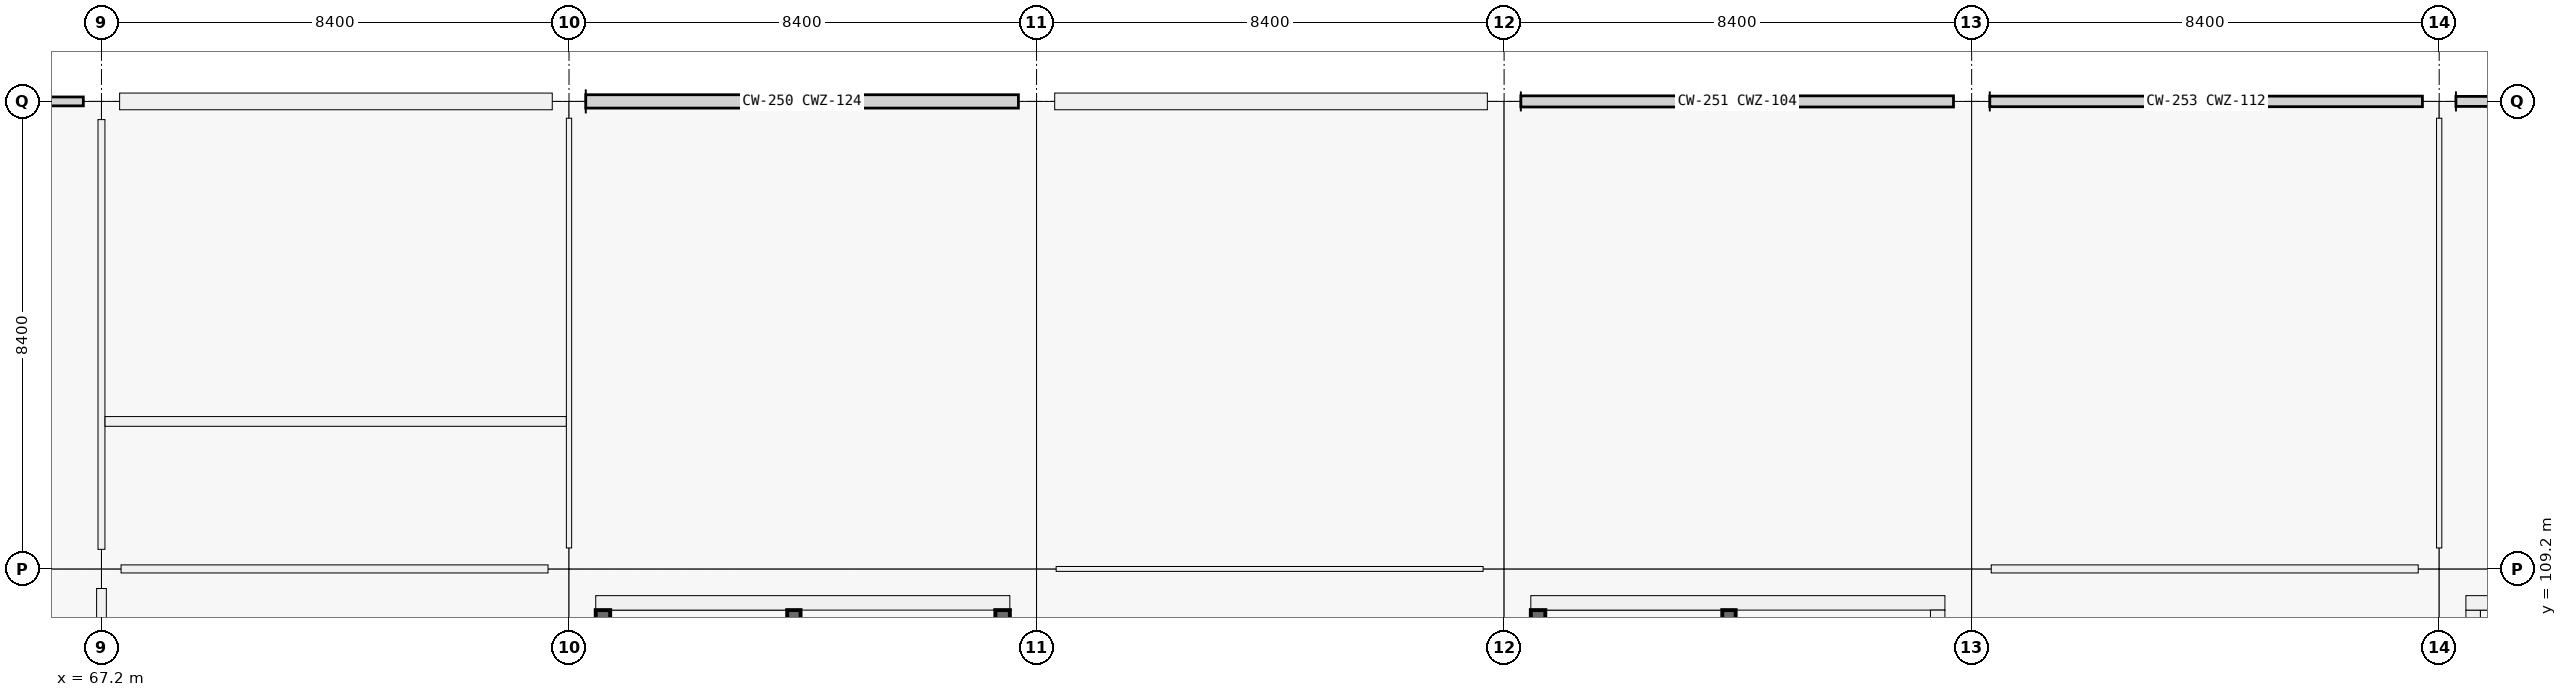
"""IFC4 building model, lengths in metres.
Left out: names, types, materials, properties, quantities, classifications, styles, units other than length and angle.
Written with IfcOpenShell. Run it as: python <this file> out.ifc"""

import sys

from ifc_helpers import new_model, si_unit, direction, frame, frame_2d, origin, origin_2d, place, context, subcontext, project, spatial, rectangle, extrude, element, fill, save


model = new_model("IFC4")
c1 = context("Model", 3, precision=1e-05, world=origin(), true_north=direction((0.0, 1.0)))
c2 = subcontext(c1, "Body", "Model", "MODEL_VIEW")
j1 = project(units=[si_unit("LENGTHUNIT", "METRE"), si_unit("PLANEANGLEUNIT", "RADIAN")], contexts=[c1])
p1 = place(None, origin())
s1 = spatial("IfcSite", under=j1, at=p1, CompositionType="ELEMENT")
p2 = place(p1, origin())
s2 = spatial("IfcBuilding", under=s1, at=p2, CompositionType="ELEMENT")
p3 = place(p2, frame((0.0, 0.0, 19.08)))
s3 = spatial("IfcBuildingStorey", under=s2, at=p3, CompositionType="ELEMENT", Elevation=19.08)
p4 = place(p3, frame((67.2, 109.2, 0.0), z_axis=(0.0, 0.0, 1.0), x_axis=(1.0, 0.0, 0.0)))
e1 = element("IfcColumn", 1, at=p4, inside=s3, PredefinedType="COLUMN", context=c2, shape_type="SweptSolid", body=[
    extrude(rectangle(XDim=0.7, YDim=0.7, at=origin_2d()), origin(), (0.0, 0.0, 1.0), 4.32),
])
p5 = place(p3, frame((67.2, 117.6, 0.0), z_axis=(0.0, 0.0, 1.0), x_axis=(1.0, 0.0, 0.0)))
e2 = element("IfcColumn", 2, at=p5, inside=s3, PredefinedType="COLUMN", context=c2, shape_type="SweptSolid", body=[
    extrude(rectangle(XDim=0.65, YDim=0.65, at=origin_2d()), origin(), (0.0, 0.0, 1.0), 4.32),
])
p6 = place(p3, frame((75.6, 109.2, 0.0), z_axis=(0.0, 0.0, 1.0), x_axis=(1.0, 0.0, 0.0)))
e3 = element("IfcColumn", 3, at=p6, inside=s3, PredefinedType="COLUMN", context=c2, shape_type="SweptSolid", body=[
    extrude(rectangle(XDim=0.75, YDim=0.75, at=origin_2d()), origin(), (0.0, 0.0, 1.0), 4.32),
])
p7 = place(p3, frame((75.6, 117.6, 0.0), z_axis=(0.0, 0.0, 1.0), x_axis=(1.0, 0.0, 0.0)))
e4 = element("IfcColumn", 4, at=p7, inside=s3, PredefinedType="COLUMN", context=c2, shape_type="SweptSolid", body=[
    extrude(rectangle(XDim=0.6, YDim=0.6, at=origin_2d()), origin(), (0.0, 0.0, 1.0), 4.32),
])
p8 = place(p3, frame((84.0, 109.2, 0.0), z_axis=(0.0, 0.0, 1.0), x_axis=(1.0, 0.0, 0.0)))
e5 = element("IfcColumn", 5, at=p8, inside=s3, PredefinedType="COLUMN", context=c2, shape_type="SweptSolid", body=[
    extrude(rectangle(XDim=0.7, YDim=0.7, at=origin_2d()), origin(), (0.0, 0.0, 1.0), 4.32),
])
p9 = place(p3, frame((84.0, 117.6, 0.0), z_axis=(0.0, 0.0, 1.0), x_axis=(1.0, 0.0, 0.0)))
e6 = element("IfcColumn", 6, at=p9, inside=s3, PredefinedType="COLUMN", context=c2, shape_type="SweptSolid", body=[
    extrude(rectangle(XDim=0.65, YDim=0.65, at=origin_2d()), origin(), (0.0, 0.0, 1.0), 4.32),
])
p10 = place(p3, frame((92.4, 109.2, 0.0), z_axis=(0.0, 0.0, 1.0), x_axis=(1.0, 0.0, 0.0)))
e7 = element("IfcColumn", 7, at=p10, inside=s3, PredefinedType="COLUMN", context=c2, shape_type="SweptSolid", body=[
    extrude(rectangle(XDim=0.75, YDim=0.75, at=origin_2d()), origin(), (0.0, 0.0, 1.0), 4.32),
])
p11 = place(p3, frame((92.4, 117.6, 0.0), z_axis=(0.0, 0.0, 1.0), x_axis=(1.0, 0.0, 0.0)))
e8 = element("IfcColumn", 8, at=p11, inside=s3, PredefinedType="COLUMN", context=c2, shape_type="SweptSolid", body=[
    extrude(rectangle(XDim=0.6, YDim=0.6, at=origin_2d()), origin(), (0.0, 0.0, 1.0), 4.32),
])
p12 = place(p3, frame((100.8, 109.2, 0.0), z_axis=(0.0, 0.0, 1.0), x_axis=(1.0, 0.0, 0.0)))
e9 = element("IfcColumn", 9, at=p12, inside=s3, PredefinedType="COLUMN", context=c2, shape_type="SweptSolid", body=[
    extrude(rectangle(XDim=0.7, YDim=0.7, at=origin_2d()), origin(), (0.0, 0.0, 1.0), 4.32),
])
p13 = place(p3, frame((100.8, 117.6, 0.0), z_axis=(0.0, 0.0, 1.0), x_axis=(1.0, 0.0, 0.0)))
e10 = element("IfcColumn", 10, at=p13, inside=s3, PredefinedType="COLUMN", context=c2, shape_type="SweptSolid", body=[
    extrude(rectangle(XDim=0.65, YDim=0.65, at=origin_2d()), origin(), (0.0, 0.0, 1.0), 4.32),
])
p14 = place(p3, frame((109.2, 109.2, 0.0), z_axis=(0.0, 0.0, 1.0), x_axis=(1.0, 0.0, 0.0)))
e11 = element("IfcColumn", 11, at=p14, inside=s3, PredefinedType="COLUMN", context=c2, shape_type="SweptSolid", body=[
    extrude(rectangle(XDim=0.75, YDim=0.75, at=origin_2d()), origin(), (0.0, 0.0, 1.0), 4.32),
])
p15 = place(p3, frame((109.2, 117.6, 0.0), z_axis=(0.0, 0.0, 1.0), x_axis=(1.0, 0.0, 0.0)))
e12 = element("IfcColumn", 12, at=p15, inside=s3, PredefinedType="COLUMN", context=c2, shape_type="SweptSolid", body=[
    extrude(rectangle(XDim=0.6, YDim=0.6, at=origin_2d()), origin(), (0.0, 0.0, 1.0), 4.32),
])
p16 = place(p3, frame((67.526, 117.6, 0.0), z_axis=(0.0, 0.0, 1.0), x_axis=(1.0, 0.0, 0.0)))
e13 = element("IfcWall", 13, at=p16, inside=s3, PredefinedType="SOLIDWALL", context=c2, shape_type="SweptSolid", body=[
    extrude(rectangle(XDim=7.773, YDim=0.3, at=frame_2d((3.887, 0.0))), origin(), (0.0, 0.0, 1.0), 3.37),
])
p17 = place(p16, frame((2.811, 0.0, 0.9)))
e14 = element("IfcOpeningElement", 14, at=p17, cuts=e13, PredefinedType="OPENING", context=c2, shape_type="SweptSolid", body=[
    extrude(rectangle(XDim=2.15, YDim=1.95, at=frame_2d((1.075, 0.975))), frame((0.0, 0.15, 0.0), z_axis=(0.0, -1.0, 0.0), x_axis=(1.0, 0.0, 0.0)), (0.0, 0.0, 1.0), 0.3),
])
p18 = place(p3, frame((84.326, 117.6, 0.0), z_axis=(0.0, 0.0, 1.0), x_axis=(1.0, 0.0, 0.0)))
e15 = element("IfcWall", 15, at=p18, inside=s3, PredefinedType="SOLIDWALL", context=c2, shape_type="SweptSolid", body=[
    extrude(rectangle(XDim=7.773, YDim=0.3, at=frame_2d((3.887, 0.0))), origin(), (0.0, 0.0, 1.0), 3.37),
])
p19 = place(p18, frame((3.236, 0.0, 0.9)))
e16 = element("IfcOpeningElement", 16, at=p19, cuts=e15, PredefinedType="OPENING", context=c2, shape_type="SweptSolid", body=[
    extrude(rectangle(XDim=1.3, YDim=1.95, at=frame_2d((0.65, 0.975))), frame((0.0, 0.15, 0.0), z_axis=(0.0, -1.0, 0.0), x_axis=(1.0, 0.0, 0.0)), (0.0, 0.0, 1.0), 0.3),
])
p20 = place(p3, frame((109.81, 101.54, 0.0), z_axis=(0.0, 0.0, 1.0), x_axis=(0.0, 1.0, 0.0)))
e17 = element("IfcWall", 17, at=p20, inside=s3, PredefinedType="SHEAR", context=c2, shape_type="SweptSolid", body=[
    extrude(rectangle(XDim=6.92, YDim=0.26, at=frame_2d((3.46, 0.0))), origin(), (0.0, 0.0, 1.0), 4.32),
])
p21 = place(p3, frame((109.68, 108.59, 0.0), z_axis=(0.0, 0.0, 1.0), x_axis=(1.0, 0.0, 0.0)))
e18 = element("IfcWall", 18, at=p21, inside=s3, PredefinedType="SHEAR", context=c2, shape_type="SweptSolid", body=[
    extrude(rectangle(XDim=7.44, YDim=0.26, at=frame_2d((3.72, 0.0))), origin(), (0.0, 0.0, 1.0), 4.32),
])
p22 = place(p3, frame((76.21, 101.54, 0.0), z_axis=(0.0, 0.0, 1.0), x_axis=(0.0, 1.0, 0.0)))
e19 = element("IfcWall", 19, at=p22, inside=s3, PredefinedType="SHEAR", context=c2, shape_type="SweptSolid", body=[
    extrude(rectangle(XDim=6.92, YDim=0.26, at=frame_2d((3.46, 0.0))), origin(), (0.0, 0.0, 1.0), 4.32),
])
p23 = place(p3, frame((76.08, 108.59, 0.0), z_axis=(0.0, 0.0, 1.0), x_axis=(1.0, 0.0, 0.0)))
e20 = element("IfcWall", 20, at=p23, inside=s3, PredefinedType="SHEAR", context=c2, shape_type="SweptSolid", body=[
    extrude(rectangle(XDim=7.44, YDim=0.26, at=frame_2d((3.72, 0.0))), origin(), (0.0, 0.0, 1.0), 4.32),
])
p24 = place(p3, frame((83.39, 108.46, 0.0), z_axis=(0.0, 0.0, 1.0), x_axis=(0.0, -1.0, 0.0)))
e21 = element("IfcWall", 21, at=p24, inside=s3, PredefinedType="SHEAR", context=c2, shape_type="SweptSolid", body=[
    extrude(rectangle(XDim=6.92, YDim=0.26, at=frame_2d((3.46, 0.0))), origin(), (0.0, 0.0, 1.0), 4.32),
])
p25 = place(p24, frame((4.01, 0.0, 0.0)))
e22 = element("IfcOpeningElement", 22, at=p25, cuts=e21, PredefinedType="OPENING", context=c2, shape_type="SweptSolid", body=[
    extrude(rectangle(XDim=1.5, YDim=2.15, at=frame_2d((0.75, 1.075))), frame((0.0, 0.13, 0.0), z_axis=(0.0, -1.0, 0.0), x_axis=(1.0, 0.0, 0.0)), (0.0, 0.0, 1.0), 0.26),
])
p26 = place(p3, frame((79.64, 101.54, 0.0), z_axis=(0.0, 0.0, 1.0), x_axis=(0.0, 1.0, 0.0)))
e23 = element("IfcWall", 23, at=p26, inside=s3, PredefinedType="SHEAR", context=c2, shape_type="SweptSolid", body=[
    extrude(rectangle(XDim=6.92, YDim=0.24, at=frame_2d((3.46, 0.0))), origin(), (0.0, 0.0, 1.0), 4.32),
])
p27 = place(p26, frame((0.12, 0.0, 0.0)))
e24 = element("IfcOpeningElement", 24, at=p27, cuts=e23, PredefinedType="OPENING", context=c2, shape_type="SweptSolid", body=[
    extrude(rectangle(XDim=1.0, YDim=2.15, at=frame_2d((0.5, 1.075))), frame((0.0, 0.12, 0.0), z_axis=(0.0, -1.0, 0.0), x_axis=(1.0, 0.0, 0.0)), (0.0, 0.0, 1.0), 0.24),
])
p28 = place(p3, frame((93.01, 101.54, 0.0), z_axis=(0.0, 0.0, 1.0), x_axis=(0.0, 1.0, 0.0)))
e25 = element("IfcWall", 25, at=p28, inside=s3, PredefinedType="SHEAR", context=c2, shape_type="SweptSolid", body=[
    extrude(rectangle(XDim=6.92, YDim=0.26, at=frame_2d((3.46, 0.0))), origin(), (0.0, 0.0, 1.0), 4.32),
])
p29 = place(p3, frame((92.88, 108.59, 0.0), z_axis=(0.0, 0.0, 1.0), x_axis=(1.0, 0.0, 0.0)))
e26 = element("IfcWall", 26, at=p29, inside=s3, PredefinedType="SHEAR", context=c2, shape_type="SweptSolid", body=[
    extrude(rectangle(XDim=7.44, YDim=0.26, at=frame_2d((3.72, 0.0))), origin(), (0.0, 0.0, 1.0), 4.32),
])
p30 = place(p3, frame((100.19, 108.46, 0.0), z_axis=(0.0, 0.0, 1.0), x_axis=(0.0, -1.0, 0.0)))
e27 = element("IfcWall", 27, at=p30, inside=s3, PredefinedType="SHEAR", context=c2, shape_type="SweptSolid", body=[
    extrude(rectangle(XDim=6.92, YDim=0.26, at=frame_2d((3.46, 0.0))), origin(), (0.0, 0.0, 1.0), 4.32),
])
p31 = place(p30, frame((4.01, 0.0, 0.0)))
e28 = element("IfcOpeningElement", 28, at=p31, cuts=e27, PredefinedType="OPENING", context=c2, shape_type="SweptSolid", body=[
    extrude(rectangle(XDim=1.5, YDim=2.15, at=frame_2d((0.75, 1.075))), frame((0.0, 0.13, 0.0), z_axis=(0.0, -1.0, 0.0), x_axis=(1.0, 0.0, 0.0)), (0.0, 0.0, 1.0), 0.26),
])
p32 = place(p3, frame((96.44, 101.54, 0.0), z_axis=(0.0, 0.0, 1.0), x_axis=(0.0, 1.0, 0.0)))
e29 = element("IfcWall", 29, at=p32, inside=s3, PredefinedType="SHEAR", context=c2, shape_type="SweptSolid", body=[
    extrude(rectangle(XDim=6.92, YDim=0.24, at=frame_2d((3.46, 0.0))), origin(), (0.0, 0.0, 1.0), 4.32),
])
p33 = place(p32, frame((0.12, 0.0, 0.0)))
e30 = element("IfcOpeningElement", 30, at=p33, cuts=e29, PredefinedType="OPENING", context=c2, shape_type="SweptSolid", body=[
    extrude(rectangle(XDim=1.0, YDim=2.15, at=frame_2d((0.5, 1.075))), frame((0.0, 0.12, 0.0), z_axis=(0.0, -1.0, 0.0), x_axis=(1.0, 0.0, 0.0)), (0.0, 0.0, 1.0), 0.24),
])
p34 = place(p3, frame((67.552, 109.2, 0.0), z_axis=(0.0, 0.0, 1.0), x_axis=(1.0, 0.0, 0.0)))
e31 = element("IfcWall", 31, at=p34, inside=s3, PredefinedType="PARTITIONING", context=c2, shape_type="SweptSolid", body=[
    extrude(rectangle(XDim=7.671, YDim=0.145, at=frame_2d((3.835, 0.0))), origin(), (0.0, 0.0, 1.0), 3.19),
])
p35 = place(p3, frame((84.352, 109.2, 0.0), z_axis=(0.0, 0.0, 1.0), x_axis=(1.0, 0.0, 0.0)))
e32 = element("IfcWall", 32, at=p35, inside=s3, PredefinedType="PARTITIONING", context=c2, shape_type="SweptSolid", body=[
    extrude(rectangle(XDim=7.671, YDim=0.088, at=frame_2d((3.835, 0.0))), origin(), (0.0, 0.0, 1.0), 3.19),
])
p36 = place(p35, frame((3.296, 0.0, 0.0)))
e33 = element("IfcOpeningElement", 33, at=p36, cuts=e32, PredefinedType="OPENING", context=c2, shape_type="SweptSolid", body=[
    extrude(rectangle(XDim=1.08, YDim=2.25, at=frame_2d((0.54, 1.125))), frame((0.0, 0.044, 0.0), z_axis=(0.0, -1.0, 0.0), x_axis=(1.0, 0.0, 0.0)), (0.0, 0.0, 1.0), 0.088),
])
p37 = place(p3, frame((101.152, 109.2, 0.0), z_axis=(0.0, 0.0, 1.0), x_axis=(1.0, 0.0, 0.0)))
e34 = element("IfcWall", 34, at=p37, inside=s3, PredefinedType="PARTITIONING", context=c2, shape_type="SweptSolid", body=[
    extrude(rectangle(XDim=7.671, YDim=0.145, at=frame_2d((3.835, 0.0))), origin(), (0.0, 0.0, 1.0), 3.19),
])
p38 = place(p37, frame((3.306, 0.0, 0.0)))
e35 = element("IfcOpeningElement", 35, at=p38, cuts=e34, PredefinedType="OPENING", context=c2, shape_type="SweptSolid", body=[
    extrude(rectangle(XDim=1.06, YDim=2.25, at=frame_2d((0.53, 1.125))), frame((0.0, 0.073, 0.0), z_axis=(0.0, -1.0, 0.0), x_axis=(1.0, 0.0, 0.0)), (0.0, 0.0, 1.0), 0.145),
])
p39 = place(p3, frame((67.2, 101.177, 0.0), z_axis=(0.0, 0.0, 1.0), x_axis=(0.0, 1.0, 0.0)))
e36 = element("IfcWall", 36, at=p39, inside=s3, PredefinedType="PARTITIONING", context=c2, shape_type="SweptSolid", body=[
    extrude(rectangle(XDim=7.671, YDim=0.175, at=frame_2d((3.835, 0.0))), origin(), (0.0, 0.0, 1.0), 3.19),
])
p40 = place(p39, frame((3.376, 0.0, 0.0)))
e37 = element("IfcOpeningElement", 37, at=p40, cuts=e36, PredefinedType="OPENING", context=c2, shape_type="SweptSolid", body=[
    extrude(rectangle(XDim=0.92, YDim=2.15, at=frame_2d((0.46, 1.075))), frame((0.0, 0.087, 0.0), z_axis=(0.0, -1.0, 0.0), x_axis=(1.0, 0.0, 0.0)), (0.0, 0.0, 1.0), 0.175),
])
p41 = place(p3, frame((67.2, 109.552, 0.0), z_axis=(0.0, 0.0, 1.0), x_axis=(0.0, 1.0, 0.0)))
e38 = element("IfcWall", 38, at=p41, inside=s3, PredefinedType="PARTITIONING", context=c2, shape_type="SweptSolid", body=[
    extrude(rectangle(XDim=7.721, YDim=0.125, at=frame_2d((3.86, 0.0))), origin(), (0.0, 0.0, 1.0), 3.19),
])
p42 = place(p41, frame((0.653, 0.0, 0.0)))
e39 = element("IfcOpeningElement", 39, at=p42, cuts=e38, PredefinedType="OPENING", context=c2, shape_type="SweptSolid", body=[
    extrude(rectangle(XDim=0.92, YDim=2.1, at=frame_2d((0.46, 1.05))), frame((0.0, 0.062, 0.0), z_axis=(0.0, -1.0, 0.0), x_axis=(1.0, 0.0, 0.0)), (0.0, 0.0, 1.0), 0.125),
])
p43 = place(p41, frame((4.543, 0.0, 0.0)))
e40 = element("IfcOpeningElement", 40, at=p43, cuts=e38, PredefinedType="OPENING", context=c2, shape_type="SweptSolid", body=[
    extrude(rectangle(XDim=0.98, YDim=2.08, at=frame_2d((0.49, 1.04))), frame((0.0, 0.062, 0.0), z_axis=(0.0, -1.0, 0.0), x_axis=(1.0, 0.0, 0.0)), (0.0, 0.0, 1.0), 0.125),
])
p44 = place(p3, frame((75.6, 109.577, 0.0), z_axis=(0.0, 0.0, 1.0), x_axis=(0.0, 1.0, 0.0)))
e41 = element("IfcWall", 41, at=p44, inside=s3, PredefinedType="PARTITIONING", context=c2, shape_type="SweptSolid", body=[
    extrude(rectangle(XDim=7.721, YDim=0.095, at=frame_2d((3.861, 0.0))), origin(), (0.0, 0.0, 1.0), 3.19),
])
p45 = place(p3, frame((109.2, 109.577, 0.0), z_axis=(0.0, 0.0, 1.0), x_axis=(0.0, 1.0, 0.0)))
e42 = element("IfcWall", 42, at=p45, inside=s3, PredefinedType="PARTITIONING", context=c2, shape_type="SweptSolid", body=[
    extrude(rectangle(XDim=7.721, YDim=0.095, at=frame_2d((3.861, 0.0))), origin(), (0.0, 0.0, 1.0), 3.19),
])
p46 = place(p45, frame((3.351, 0.0, 0.0)))
e43 = element("IfcOpeningElement", 43, at=p46, cuts=e42, PredefinedType="OPENING", context=c2, shape_type="SweptSolid", body=[
    extrude(rectangle(XDim=1.02, YDim=2.2, at=frame_2d((0.51, 1.1))), frame((0.0, 0.047, 0.0), z_axis=(0.0, -1.0, 0.0), x_axis=(1.0, 0.0, 0.0)), (0.0, 0.0, 1.0), 0.095),
])
p47 = place(p3, frame((67.264, 111.85, 0.0), z_axis=(0.0, 0.0, 1.0), x_axis=(1.0, 0.0, 0.0)))
e44 = element("IfcWall", 44, at=p47, inside=s3, PredefinedType="PARTITIONING", context=c2, shape_type="SweptSolid", body=[
    extrude(rectangle(XDim=8.286, YDim=0.175, at=frame_2d((4.143, 0.0))), origin(), (0.0, 0.0, 1.0), 3.19),
])
p48 = place(p17, origin())
e45 = element("IfcWindow", 45, at=p48, inside=s3, PartitioningType="SINGLE_PANEL", PredefinedType="WINDOW", context=c2, shape_type="SweptSolid", body=[
    extrude(rectangle(XDim=2.15, YDim=1.95, at=frame_2d((1.075, 0.975))), frame((0.0, 0.03, 0.0), z_axis=(0.0, -1.0, 0.0), x_axis=(1.0, 0.0, 0.0)), (0.0, 0.0, 1.0), 0.06),
])
fill(e14, e45)
p49 = place(p19, origin())
e46 = element("IfcWindow", 46, at=p49, inside=s3, PartitioningType="SINGLE_PANEL", PredefinedType="WINDOW", context=c2, shape_type="SweptSolid", body=[
    extrude(rectangle(XDim=1.3, YDim=1.95, at=frame_2d((0.65, 0.975))), frame((0.0, 0.03, 0.0), z_axis=(0.0, -1.0, 0.0), x_axis=(1.0, 0.0, 0.0)), (0.0, 0.0, 1.0), 0.06),
])
fill(e16, e46)
p50 = place(p42, origin())
e47 = element("IfcDoor", 47, at=p50, inside=s3, OperationType="SINGLE_SWING_LEFT", PredefinedType="DOOR", context=c2, shape_type="SweptSolid", body=[
    extrude(rectangle(XDim=0.92, YDim=2.1, at=frame_2d((0.46, 1.05))), frame((0.0, 0.025, 0.0), z_axis=(0.0, -1.0, 0.0), x_axis=(1.0, 0.0, 0.0)), (0.0, 0.0, 1.0), 0.05),
])
fill(e39, e47)
p51 = place(p43, origin())
e48 = element("IfcDoor", 48, at=p51, inside=s3, OperationType="SINGLE_SWING_RIGHT", PredefinedType="DOOR", context=c2, shape_type="SweptSolid", body=[
    extrude(rectangle(XDim=0.98, YDim=2.08, at=frame_2d((0.49, 1.04))), frame((0.0, 0.025, 0.0), z_axis=(0.0, -1.0, 0.0), x_axis=(1.0, 0.0, 0.0)), (0.0, 0.0, 1.0), 0.05),
])
fill(e40, e48)
p52 = place(p36, origin())
e49 = element("IfcDoor", 49, at=p52, inside=s3, OperationType="SINGLE_SWING_RIGHT", PredefinedType="DOOR", context=c2, shape_type="SweptSolid", body=[
    extrude(rectangle(XDim=1.08, YDim=2.25, at=frame_2d((0.54, 1.125))), frame((0.0, 0.025, 0.0), z_axis=(0.0, -1.0, 0.0), x_axis=(1.0, 0.0, 0.0)), (0.0, 0.0, 1.0), 0.05),
])
fill(e33, e49)
p53 = place(p38, origin())
e50 = element("IfcDoor", 50, at=p53, inside=s3, OperationType="SINGLE_SWING_LEFT", PredefinedType="DOOR", context=c2, shape_type="SweptSolid", body=[
    extrude(rectangle(XDim=1.06, YDim=2.25, at=frame_2d((0.53, 1.125))), frame((0.0, 0.025, 0.0), z_axis=(0.0, -1.0, 0.0), x_axis=(1.0, 0.0, 0.0)), (0.0, 0.0, 1.0), 0.05),
])
fill(e35, e50)
p54 = place(p46, origin())
e51 = element("IfcDoor", 51, at=p54, inside=s3, OperationType="SINGLE_SWING_RIGHT", PredefinedType="DOOR", context=c2, shape_type="SweptSolid", body=[
    extrude(rectangle(XDim=1.02, YDim=2.2, at=frame_2d((0.51, 1.1))), frame((0.0, 0.025, 0.0), z_axis=(0.0, -1.0, 0.0), x_axis=(1.0, 0.0, 0.0)), (0.0, 0.0, 1.0), 0.05),
])
fill(e43, e51)
save(model, sys.argv[1])
